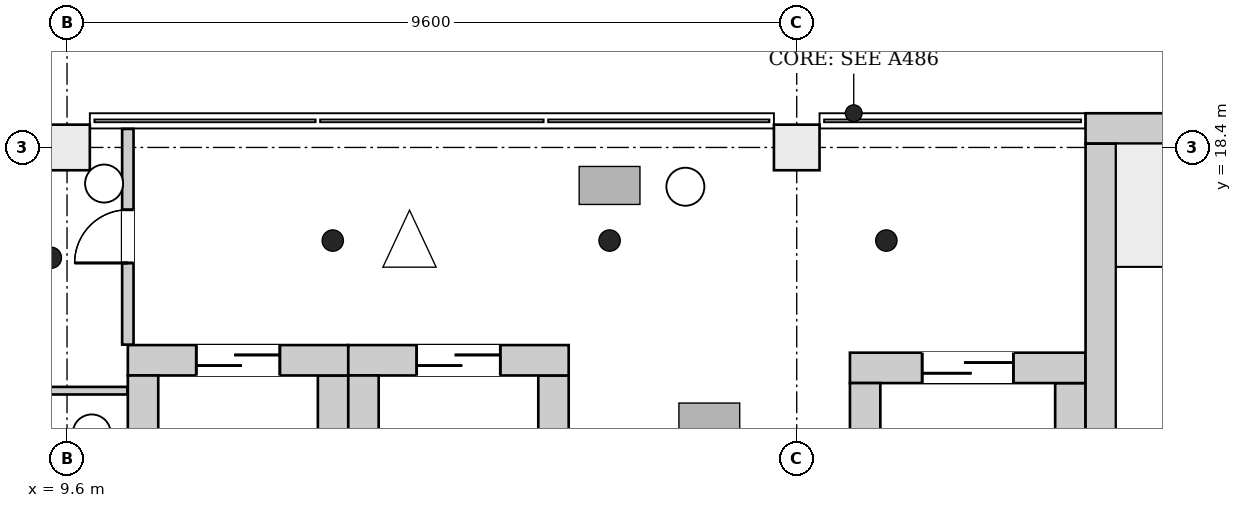
"""IFC4 building model, lengths in metres.
Left out: names, types, materials, properties, quantities, classifications, styles, units other than length and angle.
Written with IfcOpenShell. Run it as: python <this file> out.ifc"""

import sys

from ifc_helpers import new_model, si_unit, direction, frame, frame_2d, origin, origin_2d, place, context, subcontext, project, spatial, rectangle, extrude, element, fill, save


model = new_model("IFC4")
c1 = context("Model", 3, precision=1e-05, world=origin(), true_north=direction((0.0, 1.0)))
c2 = subcontext(c1, "Body", "Model", "MODEL_VIEW")
j1 = project(units=[si_unit("LENGTHUNIT", "METRE"), si_unit("PLANEANGLEUNIT", "RADIAN")], contexts=[c1])
p1 = place(None, origin())
s1 = spatial("IfcSite", under=j1, at=p1, CompositionType="ELEMENT")
p2 = place(p1, origin())
s2 = spatial("IfcBuilding", under=s1, at=p2, CompositionType="ELEMENT")
p3 = place(p2, frame((0.0, 0.0, 73.9)))
s3 = spatial("IfcBuildingStorey", under=s2, at=p3, CompositionType="ELEMENT", Elevation=73.9)
p4 = place(p3, frame((23.0, 18.65, 0.0), z_axis=(0.0, 0.0, 1.0), x_axis=(1.0, 0.0, 0.0)))
e1 = element("IfcWall", 1, at=p4, inside=s3, PredefinedType="SHEAR", context=c2, shape_type="SweptSolid", body=[
    extrude(rectangle(XDim=4.2, YDim=0.4, at=frame_2d((2.1, 0.0))), origin(), (0.0, 0.0, 1.0), 4.2),
])
p5 = place(p3, frame((23.2, 11.85, 0.0), z_axis=(0.0, 0.0, 1.0), x_axis=(0.0, 1.0, 0.0)))
e2 = element("IfcWall", 2, at=p5, inside=s3, PredefinedType="SHEAR", context=c2, shape_type="SweptSolid", body=[
    extrude(rectangle(XDim=6.6, YDim=0.4, at=frame_2d((3.3, 0.0))), origin(), (0.0, 0.0, 1.0), 4.2),
])
p6 = place(p3, frame((10.4, 15.6, 0.0), z_axis=(0.0, 0.0, 1.0), x_axis=(1.0, 0.0, 0.0)))
e3 = element("IfcWall", 3, at=p6, inside=s3, PredefinedType="SHEAR", context=c2, shape_type="SweptSolid", body=[
    extrude(rectangle(XDim=2.9, YDim=0.4, at=frame_2d((1.45, 0.0))), origin(), (0.0, 0.0, 1.0), 4.2),
])
p7 = place(p6, frame((0.9, 0.0, 0.0)))
e4 = element("IfcOpeningElement", 4, at=p7, cuts=e3, PredefinedType="OPENING", context=c2, shape_type="SweptSolid", body=[
    extrude(rectangle(XDim=1.1, YDim=2.1, at=frame_2d((0.55, 1.05))), frame((0.0, 0.21, 0.0), z_axis=(0.0, -1.0, 0.0), x_axis=(1.0, 0.0, 0.0)), (0.0, 0.0, 1.0), 0.42),
])
for number, where, z_axis, x_axis in (
    (5, (10.6, 12.4, 0.0), (0.0, 0.0, 1.0), (0.0, 1.0, 0.0)),
    (6, (13.1, 12.4, 0.0), (0.0, 0.0, 1.0), (0.0, 1.0, 0.0)),
):
    element("IfcWall", number, at=place(p3, frame(where, z_axis=z_axis, x_axis=x_axis)), inside=s3, PredefinedType="SHEAR", context=c2, shape_type="SweptSolid", body=[
        extrude(rectangle(XDim=3.0, YDim=0.4, at=frame_2d((1.5, 0.0))), origin(), (0.0, 0.0, 1.0), 4.2),
    ])
p8 = place(p3, frame((13.3, 15.6, 0.0), z_axis=(0.0, 0.0, 1.0), x_axis=(1.0, 0.0, 0.0)))
e7 = element("IfcWall", 7, at=p8, inside=s3, PredefinedType="SHEAR", context=c2, shape_type="SweptSolid", body=[
    extrude(rectangle(XDim=2.9, YDim=0.4, at=frame_2d((1.45, 0.0))), origin(), (0.0, 0.0, 1.0), 4.2),
])
p9 = place(p8, frame((0.9, 0.0, 0.0)))
e8 = element("IfcOpeningElement", 8, at=p9, cuts=e7, PredefinedType="OPENING", context=c2, shape_type="SweptSolid", body=[
    extrude(rectangle(XDim=1.1, YDim=2.1, at=frame_2d((0.55, 1.05))), frame((0.0, 0.21, 0.0), z_axis=(0.0, -1.0, 0.0), x_axis=(1.0, 0.0, 0.0)), (0.0, 0.0, 1.0), 0.42),
])
for number, where, z_axis, x_axis in (
    (9, (13.5, 12.4, 0.0), (0.0, 0.0, 1.0), (0.0, 1.0, 0.0)),
    (10, (16.0, 12.4, 0.0), (0.0, 0.0, 1.0), (0.0, 1.0, 0.0)),
):
    element("IfcWall", number, at=place(p3, frame(where, z_axis=z_axis, x_axis=x_axis)), inside=s3, PredefinedType="SHEAR", context=c2, shape_type="SweptSolid", body=[
        extrude(rectangle(XDim=3.0, YDim=0.4, at=frame_2d((1.5, 0.0))), origin(), (0.0, 0.0, 1.0), 4.2),
    ])
p10 = place(p3, frame((19.9, 15.5, 0.0), z_axis=(0.0, 0.0, 1.0), x_axis=(1.0, 0.0, 0.0)))
e11 = element("IfcWall", 11, at=p10, inside=s3, PredefinedType="SHEAR", context=c2, shape_type="SweptSolid", body=[
    extrude(rectangle(XDim=3.1, YDim=0.4, at=frame_2d((1.55, 0.0))), origin(), (0.0, 0.0, 1.0), 4.2),
])
p11 = place(p10, frame((0.95, 0.0, 0.0)))
e12 = element("IfcOpeningElement", 12, at=p11, cuts=e11, PredefinedType="OPENING", context=c2, shape_type="SweptSolid", body=[
    extrude(rectangle(XDim=1.2, YDim=2.1, at=frame_2d((0.6, 1.05))), frame((0.0, 0.21, 0.0), z_axis=(0.0, -1.0, 0.0), x_axis=(1.0, 0.0, 0.0)), (0.0, 0.0, 1.0), 0.42),
])
for number, where, z_axis, x_axis in (
    (13, (20.1, 11.9, 0.0), (0.0, 0.0, 1.0), (0.0, 1.0, 0.0)),
    (14, (22.8, 11.9, 0.0), (0.0, 0.0, 1.0), (0.0, 1.0, 0.0)),
):
    element("IfcWall", number, at=place(p3, frame(where, z_axis=z_axis, x_axis=x_axis)), inside=s3, PredefinedType="SHEAR", context=c2, shape_type="SweptSolid", body=[
        extrude(rectangle(XDim=3.4, YDim=0.4, at=frame_2d((1.7, 0.0))), origin(), (0.0, 0.0, 1.0), 4.2),
    ])
for number, where, z_axis, x_axis in (
    (15, (9.6, 18.4, 0.0), (0.0, 0.0, 1.0), (1.0, 0.0, 0.0)),
    (16, (19.2, 18.4, 0.0), (0.0, 0.0, 1.0), (1.0, 0.0, 0.0)),
):
    element("IfcColumn", number, at=place(p3, frame(where, z_axis=z_axis, x_axis=x_axis)), inside=s3, PredefinedType="COLUMN", context=c2, shape_type="SweptSolid", body=[
        extrude(rectangle(XDim=0.6, YDim=0.6, at=origin_2d()), origin(), (0.0, 0.0, 1.0), 4.2),
    ])
p12 = place(p3, frame((6.275, 15.2, 0.0), z_axis=(0.0, 0.0, 1.0), x_axis=(1.0, 0.0, 0.0)))
e17 = element("IfcWall", 17, at=p12, inside=s3, PredefinedType="PARTITIONING", context=c2, shape_type="SweptSolid", body=[
    extrude(rectangle(XDim=4.119, YDim=0.1, at=frame_2d((2.06, 0.0))), origin(), (0.0, 0.0, 1.0), 3.9),
])
p13 = place(p3, frame((10.4, 15.806, 0.0), z_axis=(0.0, 0.0, 1.0), x_axis=(0.0, 1.0, 0.0)))
e18 = element("IfcWall", 18, at=p13, inside=s3, PredefinedType="PARTITIONING", context=c2, shape_type="SweptSolid", body=[
    extrude(rectangle(XDim=2.838, YDim=0.15, at=frame_2d((1.419, 0.0))), origin(), (0.0, 0.0, 1.0), 3.9),
])
p14 = place(p13, frame((1.074, 0.0, 0.0)))
e19 = element("IfcOpeningElement", 19, at=p14, cuts=e18, PredefinedType="OPENING", context=c2, shape_type="SweptSolid", body=[
    extrude(rectangle(XDim=0.7, YDim=2.1, at=frame_2d((0.35, 1.05))), frame((0.0, 0.085, 0.0), z_axis=(0.0, -1.0, 0.0), x_axis=(1.0, 0.0, 0.0)), (0.0, 0.0, 1.0), 0.17),
])
p15 = place(p7, origin())
e20 = element("IfcDoor", 20, at=p15, inside=s3, OperationType="DOUBLE_DOOR_SLIDING", PredefinedType="DOOR", context=c2, shape_type="SweptSolid", body=[
    extrude(rectangle(XDim=1.1, YDim=2.1, at=frame_2d((0.55, 1.05))), frame((0.0, 0.025, 0.0), z_axis=(0.0, -1.0, 0.0), x_axis=(1.0, 0.0, 0.0)), (0.0, 0.0, 1.0), 0.05),
])
fill(e4, e20)
p16 = place(p9, origin())
e21 = element("IfcDoor", 21, at=p16, inside=s3, OperationType="DOUBLE_DOOR_SLIDING", PredefinedType="DOOR", context=c2, shape_type="SweptSolid", body=[
    extrude(rectangle(XDim=1.1, YDim=2.1, at=frame_2d((0.55, 1.05))), frame((0.0, 0.025, 0.0), z_axis=(0.0, -1.0, 0.0), x_axis=(1.0, 0.0, 0.0)), (0.0, 0.0, 1.0), 0.05),
])
fill(e8, e21)
p17 = place(p11, origin())
e22 = element("IfcDoor", 22, at=p17, inside=s3, OperationType="DOUBLE_DOOR_SLIDING", PredefinedType="DOOR", context=c2, shape_type="SweptSolid", body=[
    extrude(rectangle(XDim=1.2, YDim=2.1, at=frame_2d((0.6, 1.05))), frame((0.0, 0.025, 0.0), z_axis=(0.0, -1.0, 0.0), x_axis=(1.0, 0.0, 0.0)), (0.0, 0.0, 1.0), 0.05),
])
fill(e12, e22)
p18 = place(p14, origin())
e23 = element("IfcDoor", 23, at=p18, inside=s3, OperationType="SINGLE_SWING_LEFT", PredefinedType="DOOR", context=c2, shape_type="SweptSolid", body=[
    extrude(rectangle(XDim=0.7, YDim=2.1, at=frame_2d((0.35, 1.05))), frame((0.0, 0.025, 0.0), z_axis=(0.0, -1.0, 0.0), x_axis=(1.0, 0.0, 0.0)), (0.0, 0.0, 1.0), 0.05),
])
fill(e19, e23)
save(model, sys.argv[1])
